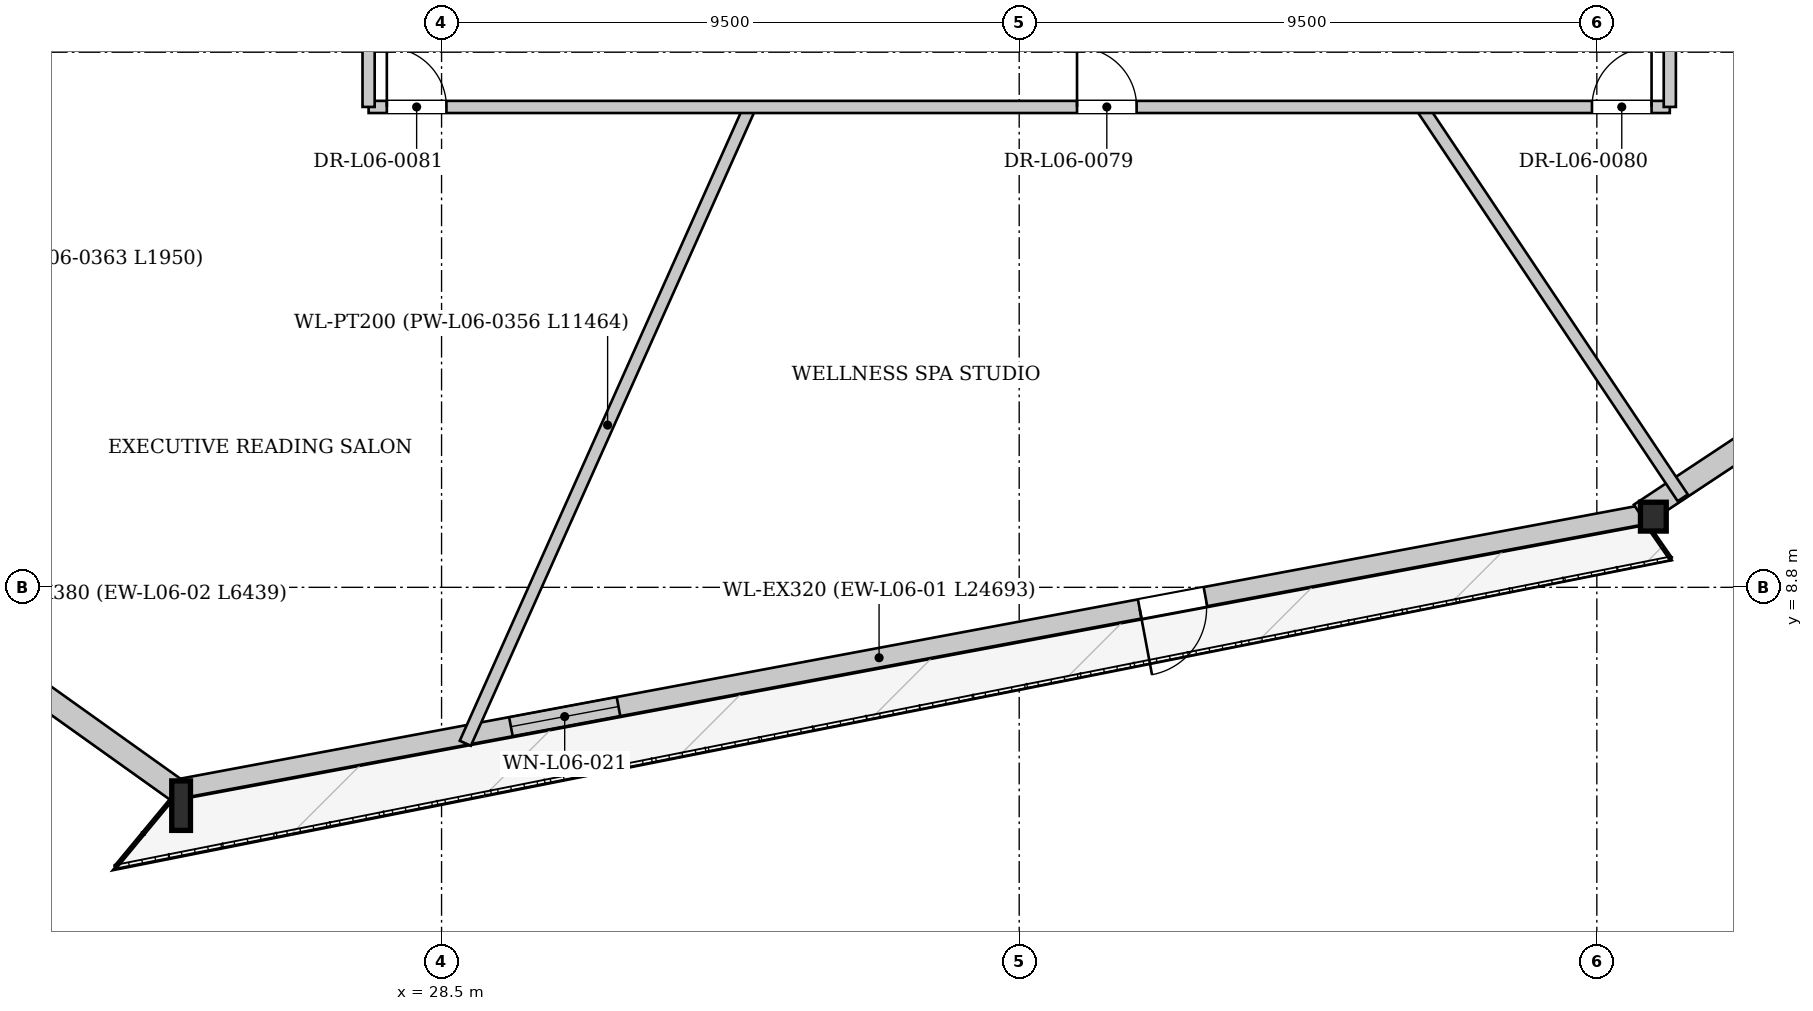
"""IFC4 building model, lengths in metres.
Left out: names, types, materials, properties, quantities, classifications, styles, units other than length and angle.
Written with IfcOpenShell. Run it as: python <this file> out.ifc"""

import sys

from ifc_helpers import new_model, si_unit, direction, frame, frame_2d, origin, origin_2d, place, context, subcontext, project, spatial, rectangle, i_section, extrude, source, transform, mapped, element, fill, save


model = new_model("IFC4")
c1 = context("Model", 3, precision=1e-05, world=origin(), true_north=direction((0.0, 1.0)))
c2 = subcontext(c1, "Body", "Model", "MODEL_VIEW")
j1 = project(units=[si_unit("LENGTHUNIT", "METRE"), si_unit("PLANEANGLEUNIT", "RADIAN")], contexts=[c1])
p1 = place(None, origin())
s1 = spatial("IfcSite", under=j1, at=p1, CompositionType="ELEMENT")
p2 = place(p1, origin())
s2 = spatial("IfcBuilding", under=s1, at=p2, CompositionType="ELEMENT")
p3 = place(p2, frame((0.0, 0.0, 29.3)))
s3 = spatial("IfcBuildingStorey", under=s2, at=p3, CompositionType="ELEMENT", Elevation=29.3)
m1 = source(origin(), c2, "Body", "SweptSolid", [
    extrude(i_section(OverallWidth=0.308, OverallDepth=0.814, WebThickness=0.021, FlangeThickness=0.04, at=origin_2d()), origin(), (0.0, 0.0, 1.0), 3.406),
])
p4 = place(p3, frame((24.047, 5.298, 0.0), z_axis=(0.099404044519, -0.052102913025, 0.993682103284), x_axis=(0.464245592076, 0.885706514731, 0.0)))
e1 = element("IfcColumn", 1, at=p4, inside=s3, PredefinedType="COLUMN", context=c2, shape_type="MappedRepresentation", body=[
    mapped(m1, transform((0.0, 0.0, 0.0), x_axis=(1.0, 0.0, 0.0), y_axis=(0.0, 1.0, 0.0), z_axis=(0.0, 0.0, 1.0), scale=1.0)),
])
m2 = source(origin(), c2, "Body", "SweptSolid", [
    extrude(i_section(OverallWidth=0.424, OverallDepth=0.474, WebThickness=0.043, FlangeThickness=0.068, at=origin_2d()), origin(), (0.0, 0.0, 1.0), 3.401),
])
p5 = place(p3, frame((48.319, 9.843, 0.0), z_axis=(0.065114905761, 0.070427478006, 0.99538938079), x_axis=(-0.73425798924, 0.678870536433, 0.0)))
e2 = element("IfcColumn", 2, at=p5, inside=s3, PredefinedType="COLUMN", context=c2, shape_type="MappedRepresentation", body=[
    mapped(m2, transform((0.0, 0.0, 0.0), x_axis=(1.0, 0.0, 0.0), y_axis=(0.0, 1.0, 0.0), z_axis=(0.0, 0.0, 1.0), scale=1.0)),
])
p6 = place(p3, frame((48.289, 10.0, 0.0), z_axis=(0.0, 0.0, 1.0), x_axis=(-0.9829231884, -0.184016319129, 0.0)))
e3 = element("IfcWall", 3, at=p6, inside=s3, PredefinedType="SOLIDWALL", context=c2, shape_type="SweptSolid", body=[
    extrude(rectangle(XDim=24.693, YDim=0.32, at=frame_2d((12.347, 0.0))), origin(), (0.0, 0.0, 1.0), 2.592),
])
p7 = place(p6, frame((7.352, 0.0, 0.0)))
e4 = element("IfcOpeningElement", 4, at=p7, cuts=e3, PredefinedType="OPENING", context=c2, shape_type="SweptSolid", body=[
    extrude(rectangle(XDim=1.1, YDim=2.3, at=frame_2d((0.55, 1.15))), frame((0.0, 0.17, 0.0), z_axis=(0.0, -1.0, 0.0), x_axis=(1.0, 0.0, 0.0)), (0.0, 0.0, 1.0), 0.34),
])
p8 = place(p6, frame((17.173, 0.0, 0.272)))
e5 = element("IfcOpeningElement", 5, at=p8, cuts=e3, PredefinedType="OPENING", context=c2, shape_type="SweptSolid", body=[
    extrude(rectangle(XDim=1.8, YDim=2.2, at=frame_2d((0.9, 1.1))), frame((0.0, 0.17, 0.0), z_axis=(0.0, -1.0, 0.0), x_axis=(1.0, 0.0, 0.0)), (0.0, 0.0, 1.0), 0.34),
])
p9 = place(p3, frame((24.157, 5.453, 0.0), z_axis=(0.0, 0.0, 1.0), x_axis=(-0.814117588061, 0.58070005408, 0.0)))
e6 = element("IfcWall", 6, at=p9, inside=s3, PredefinedType="SOLIDWALL", context=c2, shape_type="SweptSolid", body=[
    extrude(rectangle(XDim=6.439, YDim=0.38, at=frame_2d((3.219, 0.0))), origin(), (0.0, 0.0, 1.0), 2.592),
])
p10 = place(p3, frame((68.806, 23.628, 0.0), z_axis=(0.0, 0.0, 1.0), x_axis=(-0.833933142534, -0.551865485225, 0.0)))
e7 = element("IfcWall", 7, at=p10, inside=s3, PredefinedType="SOLIDWALL", context=c2, shape_type="SweptSolid", body=[
    extrude(rectangle(XDim=24.693, YDim=0.38, at=frame_2d((12.346, 0.0))), origin(), (0.0, 0.0, 1.0), 2.592),
])
p11 = place(p10, frame((5.814, 0.0, 0.222)))
e8 = element("IfcOpeningElement", 8, at=p11, cuts=e7, PredefinedType="OPENING", context=c2, shape_type="SweptSolid", body=[
    extrude(rectangle(XDim=2.2, YDim=2.25, at=frame_2d((1.1, 1.125))), frame((0.0, 0.2, 0.0), z_axis=(0.0, -1.0, 0.0), x_axis=(1.0, 0.0, 0.0)), (0.0, 0.0, 1.0), 0.4),
])
p12 = place(p10, frame((16.679, 0.0, 0.222)))
e9 = element("IfcOpeningElement", 9, at=p12, cuts=e7, PredefinedType="OPENING", context=c2, shape_type="SweptSolid", body=[
    extrude(rectangle(XDim=2.2, YDim=2.25, at=frame_2d((1.1, 1.125))), frame((0.0, 0.2, 0.0), z_axis=(0.0, -1.0, 0.0), x_axis=(1.0, 0.0, 0.0)), (0.0, 0.0, 1.0), 0.4),
])
p13 = place(p3, frame((33.572, 16.7, 0.0), z_axis=(0.0, 0.0, 1.0), x_axis=(-0.40832870075, -0.912834964352, 0.0)))
e10 = element("IfcWall", 10, at=p13, inside=s3, PredefinedType="PARTITIONING", context=c2, shape_type="SweptSolid", body=[
    extrude(rectangle(XDim=11.464, YDim=0.2, at=frame_2d((5.732, 0.0))), origin(), (0.0, 0.0, 1.0), 3.3),
])
p14 = place(p3, frame((44.617, 16.7, 0.0), z_axis=(0.0, 0.0, 1.0), x_axis=(0.555676244504, -0.831398767917, 0.0)))
e11 = element("IfcWall", 11, at=p14, inside=s3, PredefinedType="PARTITIONING", context=c2, shape_type="SweptSolid", body=[
    extrude(rectangle(XDim=7.732, YDim=0.2, at=frame_2d((3.866, 0.0))), origin(), (0.0, 0.0, 1.0), 2.785),
])
p15 = place(p3, frame((27.3, 21.071, 0.0), z_axis=(0.0, 0.0, 1.0), x_axis=(-0.888387527234, -0.459094327404, 0.0)))
e12 = element("IfcWall", 12, at=p15, inside=s3, PredefinedType="PARTITIONING", context=c2, shape_type="SweptSolid", body=[
    extrude(rectangle(XDim=11.199, YDim=0.2, at=frame_2d((5.6, 0.0))), origin(), (0.0, 0.0, 1.0), 3.3),
])
p16 = place(p3, frame((27.3, 16.7, 0.0), z_axis=(0.0, 0.0, 1.0), x_axis=(1.0, 0.0, 0.0)))
e13 = element("IfcWall", 13, at=p16, inside=s3, PredefinedType="PARTITIONING", context=c2, shape_type="SweptSolid", body=[
    extrude(rectangle(XDim=21.4, YDim=0.2, at=frame_2d((10.7, 0.0))), origin(), (0.0, 0.0, 1.0), 3.3),
])
p17 = place(p16, frame((11.651, 0.0, 0.0)))
e14 = element("IfcOpeningElement", 14, at=p17, cuts=e13, PredefinedType="OPENING", context=c2, shape_type="SweptSolid", body=[
    extrude(rectangle(XDim=0.98, YDim=2.15, at=frame_2d((0.49, 1.075))), frame((0.0, 0.11, 0.0), z_axis=(0.0, -1.0, 0.0), x_axis=(1.0, 0.0, 0.0)), (0.0, 0.0, 1.0), 0.22),
])
p18 = place(p16, frame((20.12, 0.0, 0.0)))
e15 = element("IfcOpeningElement", 15, at=p18, cuts=e13, PredefinedType="OPENING", context=c2, shape_type="SweptSolid", body=[
    extrude(rectangle(XDim=0.98, YDim=2.15, at=frame_2d((0.49, 1.075))), frame((0.0, 0.11, 0.0), z_axis=(0.0, -1.0, 0.0), x_axis=(1.0, 0.0, 0.0)), (0.0, 0.0, 1.0), 0.22),
])
p19 = place(p16, frame((0.3, 0.0, 0.0)))
e16 = element("IfcOpeningElement", 16, at=p19, cuts=e13, PredefinedType="OPENING", context=c2, shape_type="SweptSolid", body=[
    extrude(rectangle(XDim=0.98, YDim=2.15, at=frame_2d((0.49, 1.075))), frame((0.0, 0.11, 0.0), z_axis=(0.0, -1.0, 0.0), x_axis=(1.0, 0.0, 0.0)), (0.0, 0.0, 1.0), 0.22),
])
p20 = place(p3, frame((27.3, 16.7, 0.0), z_axis=(0.0, 0.0, 1.0), x_axis=(0.0, 1.0, 0.0)))
e17 = element("IfcWall", 17, at=p20, inside=s3, PredefinedType="PARTITIONING", context=c2, shape_type="SweptSolid", body=[
    extrude(rectangle(XDim=19.8, YDim=0.2, at=frame_2d((9.9, 0.0))), origin(), (0.0, 0.0, 1.0), 3.3),
])
p21 = place(p20, frame((18.52, 0.0, 0.0)))
e18 = element("IfcOpeningElement", 18, at=p21, cuts=e17, PredefinedType="OPENING", context=c2, shape_type="SweptSolid", body=[
    extrude(rectangle(XDim=0.98, YDim=2.15, at=frame_2d((0.49, 1.075))), frame((0.0, 0.11, 0.0), z_axis=(0.0, -1.0, 0.0), x_axis=(1.0, 0.0, 0.0)), (0.0, 0.0, 1.0), 0.22),
])
p22 = place(p20, frame((6.96, 0.0, 0.0)))
e19 = element("IfcOpeningElement", 19, at=p22, cuts=e17, PredefinedType="OPENING", context=c2, shape_type="SweptSolid", body=[
    extrude(rectangle(XDim=0.98, YDim=2.15, at=frame_2d((0.49, 1.075))), frame((0.0, 0.11, 0.0), z_axis=(0.0, -1.0, 0.0), x_axis=(1.0, 0.0, 0.0)), (0.0, 0.0, 1.0), 0.22),
])
p23 = place(p3, frame((48.7, 16.7, 0.0), z_axis=(0.0, 0.0, 1.0), x_axis=(0.0, 1.0, 0.0)))
e20 = element("IfcWall", 20, at=p23, inside=s3, PredefinedType="PARTITIONING", context=c2, shape_type="SweptSolid", body=[
    extrude(rectangle(XDim=19.8, YDim=0.2, at=frame_2d((9.9, 0.0))), origin(), (0.0, 0.0, 1.0), 3.3),
])
m3 = source(origin(), c2, "Body", "SweptSolid", [
    extrude(rectangle(XDim=1.1, YDim=2.3, at=frame_2d((0.55, 1.15))), frame((0.0, 0.025, 0.0), z_axis=(0.0, -1.0, 0.0), x_axis=(1.0, 0.0, 0.0)), (0.0, 0.0, 1.0), 0.05),
])
p24 = place(p7, origin())
e21 = element("IfcDoor", 21, at=p24, inside=s3, OperationType="SINGLE_SWING_RIGHT", PredefinedType="DOOR", context=c2, shape_type="MappedRepresentation", body=[
    mapped(m3, transform((0.0, 0.0, 0.0), x_axis=(1.0, 0.0, 0.0), y_axis=(0.0, 1.0, 0.0), z_axis=(0.0, 0.0, 1.0), scale=1.0)),
])
fill(e4, e21)
m4 = source(origin(), c2, "Body", "SweptSolid", [
    extrude(rectangle(XDim=1.8, YDim=2.2, at=frame_2d((0.9, 1.1))), frame((0.0, 0.03, 0.0), z_axis=(0.0, -1.0, 0.0), x_axis=(1.0, 0.0, 0.0)), (0.0, 0.0, 1.0), 0.06),
])
p25 = place(p8, origin())
e22 = element("IfcWindow", 22, at=p25, inside=s3, PartitioningType="SINGLE_PANEL", PredefinedType="WINDOW", context=c2, shape_type="MappedRepresentation", body=[
    mapped(m4, transform((0.0, 0.0, 0.0), x_axis=(1.0, 0.0, 0.0), y_axis=(0.0, 1.0, 0.0), z_axis=(0.0, 0.0, 1.0), scale=1.0)),
])
fill(e5, e22)
m5 = source(origin(), c2, "Body", "SweptSolid", [
    extrude(rectangle(XDim=0.98, YDim=2.15, at=frame_2d((0.49, 1.075))), frame((0.0, 0.025, 0.0), z_axis=(0.0, -1.0, 0.0), x_axis=(1.0, 0.0, 0.0)), (0.0, 0.0, 1.0), 0.05),
])
p26 = place(p17, origin())
e23 = element("IfcDoor", 23, at=p26, inside=s3, OperationType="SINGLE_SWING_LEFT", PredefinedType="DOOR", context=c2, shape_type="MappedRepresentation", body=[
    mapped(m5, transform((0.0, 0.0, 0.0), x_axis=(1.0, 0.0, 0.0), y_axis=(0.0, 1.0, 0.0), z_axis=(0.0, 0.0, 1.0), scale=1.0)),
])
fill(e14, e23)
p27 = place(p18, origin())
e24 = element("IfcDoor", 24, at=p27, inside=s3, OperationType="SINGLE_SWING_RIGHT", PredefinedType="DOOR", context=c2, shape_type="MappedRepresentation", body=[
    mapped(m5, transform((0.0, 0.0, 0.0), x_axis=(1.0, 0.0, 0.0), y_axis=(0.0, 1.0, 0.0), z_axis=(0.0, 0.0, 1.0), scale=1.0)),
])
fill(e15, e24)
p28 = place(p19, origin())
e25 = element("IfcDoor", 25, at=p28, inside=s3, OperationType="SINGLE_SWING_LEFT", PredefinedType="DOOR", context=c2, shape_type="MappedRepresentation", body=[
    mapped(m5, transform((0.0, 0.0, 0.0), x_axis=(1.0, 0.0, 0.0), y_axis=(0.0, 1.0, 0.0), z_axis=(0.0, 0.0, 1.0), scale=1.0)),
])
fill(e16, e25)
save(model, sys.argv[1])
